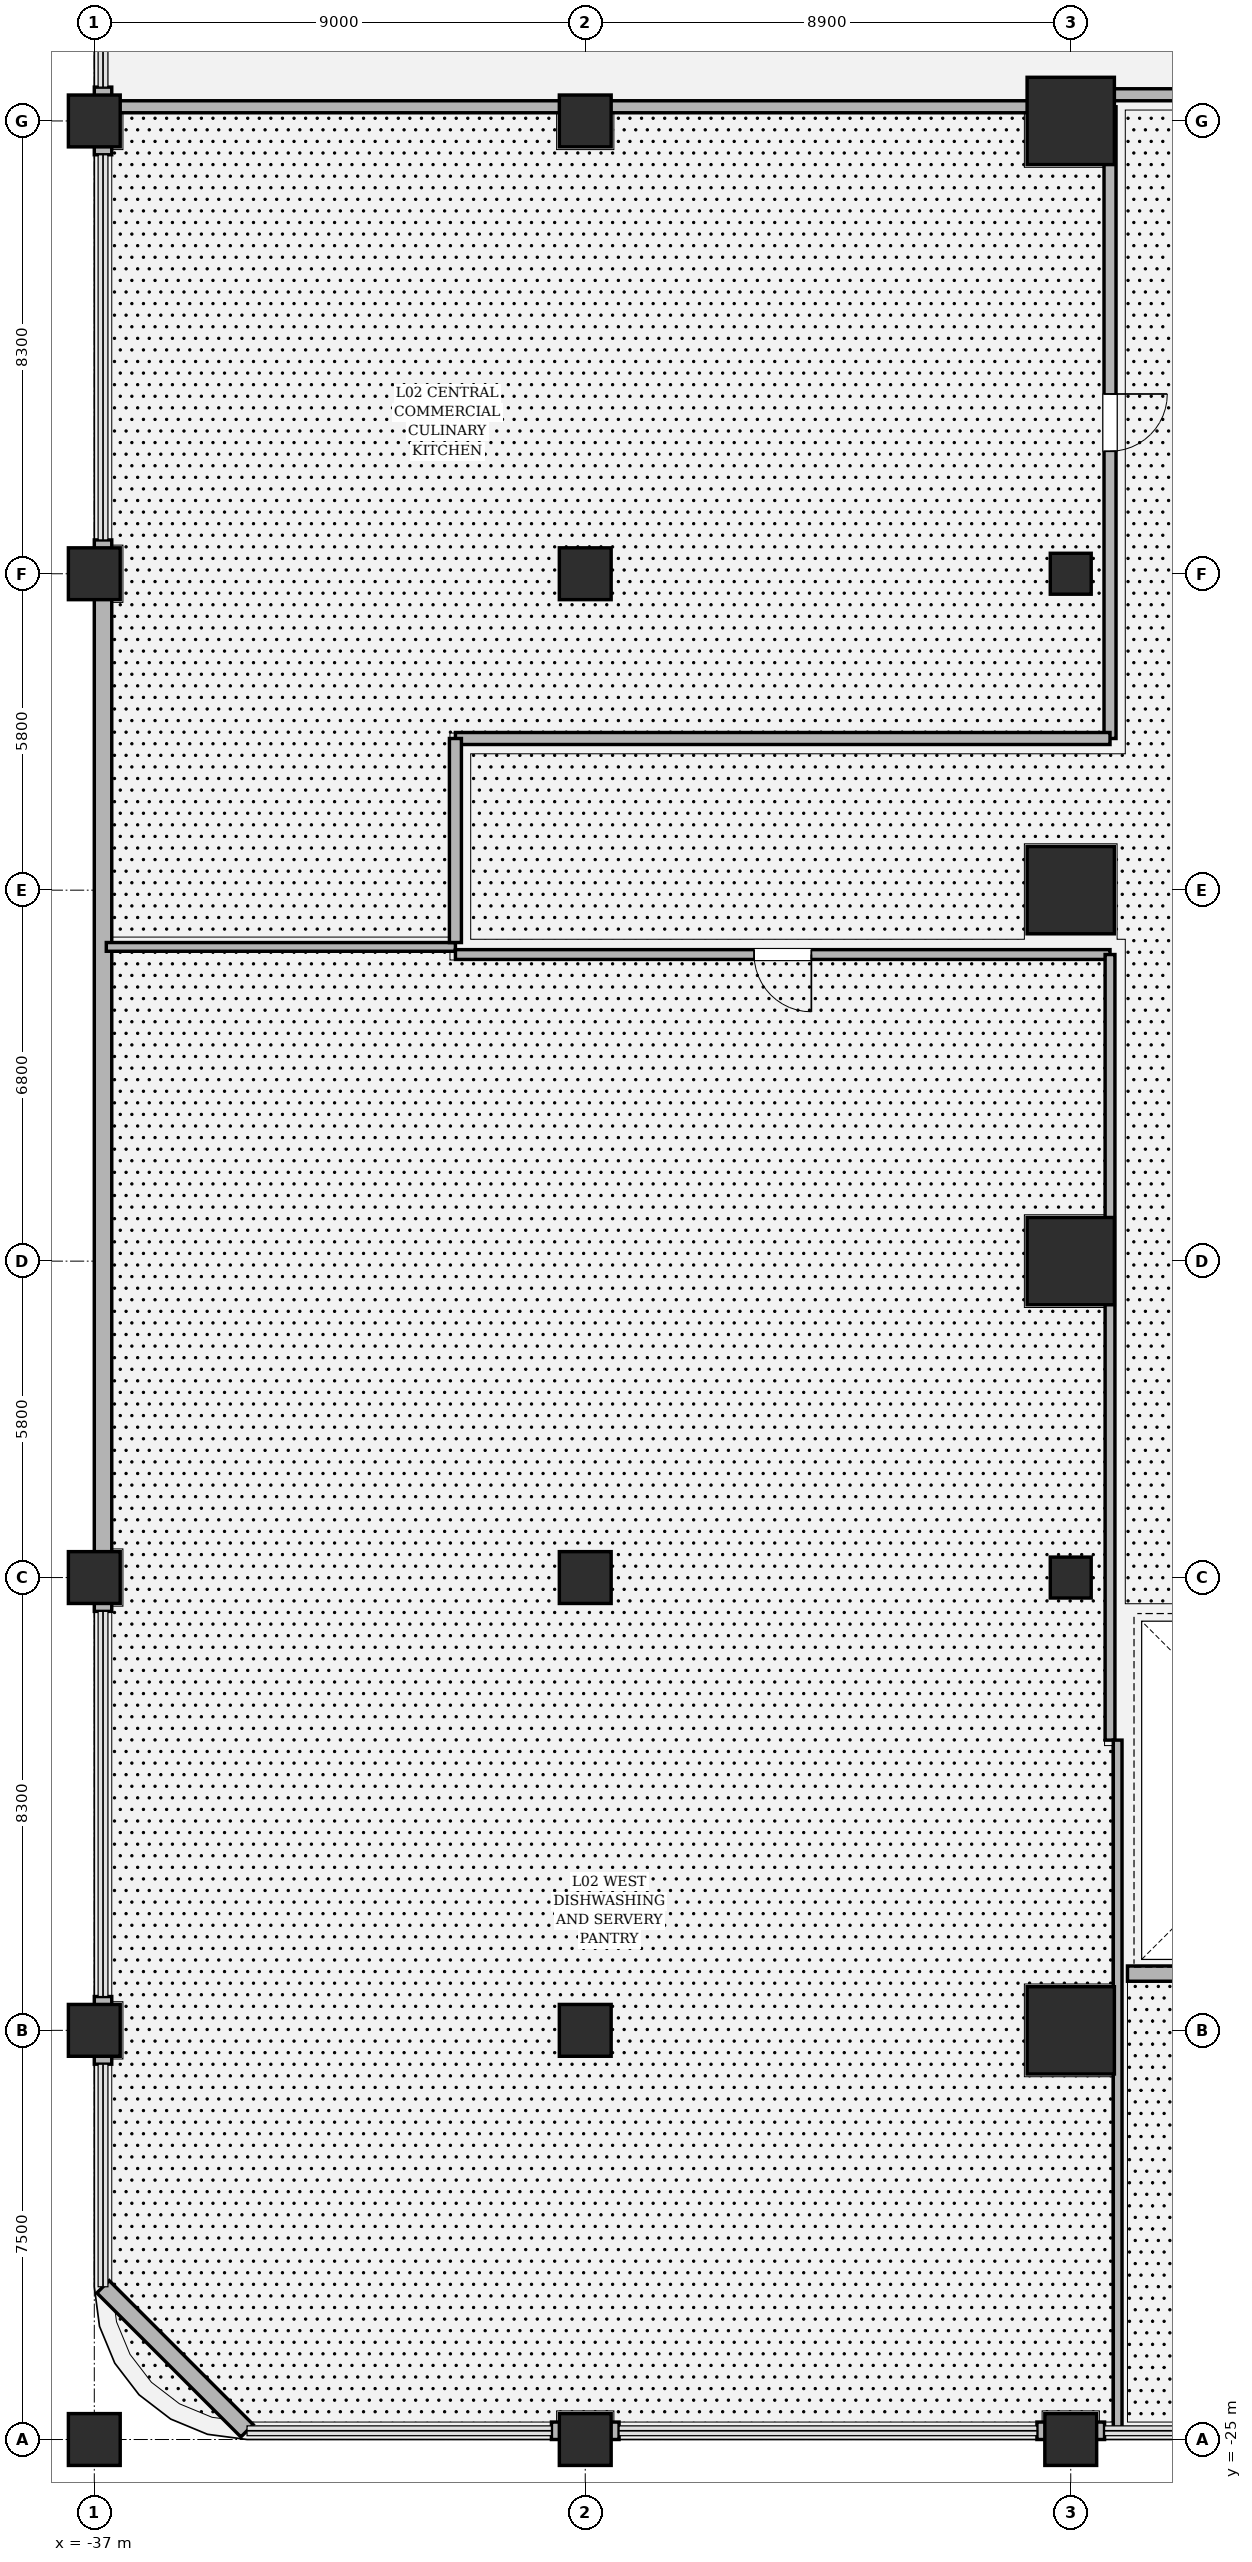
"""IFC4 building model, lengths in metres.
Left out: names, types, materials, properties, quantities, classifications, styles, units other than length and angle.
Written with IfcOpenShell. Run it as: python <this file> out.ifc"""

import sys

from ifc_helpers import new_model, si_unit, direction, frame, frame_2d, origin, origin_2d, place, context, subcontext, project, spatial, rectangle, hollow_rectangle, circle, extrude, element, fill, save


model = new_model("IFC4")
c1 = context("Model", 3, precision=1e-05, world=origin(), true_north=direction((0.0, 1.0)))
c2 = subcontext(c1, "Body", "Model", "MODEL_VIEW")
j1 = project(units=[si_unit("LENGTHUNIT", "METRE"), si_unit("PLANEANGLEUNIT", "RADIAN")], contexts=[c1])
p1 = place(None, origin())
s1 = spatial("IfcSite", under=j1, at=p1, CompositionType="ELEMENT")
p2 = place(p1, origin())
s2 = spatial("IfcBuilding", under=s1, at=p2, CompositionType="ELEMENT")
p3 = place(p2, frame((0.0, 0.0, 11.4)))
s3 = spatial("IfcBuildingStorey", under=s2, at=p3, CompositionType="ELEMENT", Elevation=11.4)
for number, where, z_axis, x_axis in (
    (1, (-19.1, -17.5, 0.0), (0.0, 0.0, 1.0), (1.0, 0.0, 0.0)),
    (2, (-19.1, 17.5, 0.0), (0.0, 0.0, 1.0), (1.0, 0.0, 0.0)),
    (3, (-19.1, 3.4, 0.0), (0.0, 0.0, 1.0), (1.0, 0.0, 0.0)),
    (4, (-19.1, -3.4, 0.0), (0.0, 0.0, 1.0), (1.0, 0.0, 0.0)),
):
    element("IfcColumn", number, at=place(p3, frame(where, z_axis=z_axis, x_axis=x_axis)), inside=s3, PredefinedType="COLUMN", context=c2, shape_type="SweptSolid", body=[
        extrude(hollow_rectangle(XDim=1.6, YDim=1.6, WallThickness=0.05, at=origin_2d()), origin(), (0.0, 0.0, 1.0), 5.4),
    ])
for number, where, z_axis, x_axis in (
    (5, (-37.0, -25.0, 0.0), (0.0, 0.0, 1.0), (1.0, 0.0, 0.0)),
    (6, (-28.0, -25.0, 0.0), (0.0, 0.0, 1.0), (1.0, 0.0, 0.0)),
    (7, (-19.1, -25.0, 0.0), (0.0, 0.0, 1.0), (1.0, 0.0, 0.0)),
    (8, (-37.0, -17.5, 0.0), (0.0, 0.0, 1.0), (1.0, 0.0, 0.0)),
    (9, (-28.0, -17.5, 0.0), (0.0, 0.0, 1.0), (1.0, 0.0, 0.0)),
    (10, (-37.0, -9.2, 0.0), (0.0, 0.0, 1.0), (1.0, 0.0, 0.0)),
    (11, (-37.0, 9.2, 0.0), (0.0, 0.0, 1.0), (1.0, 0.0, 0.0)),
    (12, (-37.0, 17.5, 0.0), (0.0, 0.0, 1.0), (1.0, 0.0, 0.0)),
    (13, (-28.0, 17.5, 0.0), (0.0, 0.0, 1.0), (1.0, 0.0, 0.0)),
    (14, (-28.0, -9.2, 0.0), (0.0, 0.0, 1.0), (1.0, 0.0, 0.0)),
    (15, (-28.0, 9.2, 0.0), (0.0, 0.0, 1.0), (1.0, 0.0, 0.0)),
):
    element("IfcColumn", number, at=place(p3, frame(where, z_axis=z_axis, x_axis=x_axis)), inside=s3, PredefinedType="COLUMN", context=c2, shape_type="SweptSolid", body=[
        extrude(rectangle(XDim=0.95, YDim=0.95, at=origin_2d()), origin(), (0.0, 0.0, 1.0), 5.4),
    ])
for number, where, z_axis, x_axis in (
    (16, (-19.1, -9.2, 0.0), (0.0, 0.0, 1.0), (1.0, 0.0, 0.0)),
    (17, (-19.1, 9.2, 0.0), (0.0, 0.0, 1.0), (1.0, 0.0, 0.0)),
):
    element("IfcColumn", number, at=place(p3, frame(where, z_axis=z_axis, x_axis=x_axis)), inside=s3, PredefinedType="PILASTER", context=c2, shape_type="SweptSolid", body=[
        extrude(circle(Radius=0.375, at=origin_2d()), origin(), (0.0, 0.0, 1.0), 5.4),
    ])
p4 = place(p3, frame((-28.62, -24.84, 0.0), z_axis=(0.0, 0.0, 1.0), x_axis=(1.0, 0.0, 0.0)))
e18 = element("IfcWall", 18, at=p4, inside=s3, PredefinedType="SOLIDWALL", context=c2, shape_type="SweptSolid", body=[
    extrude(rectangle(XDim=1.24, YDim=0.32, at=frame_2d((0.62, 0.0))), origin(), (0.0, 0.0, 1.0), 4.414),
])
p5 = place(p3, frame((-19.72, -24.84, 0.0), z_axis=(0.0, 0.0, 1.0), x_axis=(1.0, 0.0, 0.0)))
e19 = element("IfcWall", 19, at=p5, inside=s3, PredefinedType="SOLIDWALL", context=c2, shape_type="SweptSolid", body=[
    extrude(rectangle(XDim=1.24, YDim=0.32, at=frame_2d((0.62, 0.0))), origin(), (0.0, 0.0, 1.0), 4.414),
])
p6 = place(p3, frame((-36.84, -9.82, 0.0), z_axis=(0.0, 0.0, 1.0), x_axis=(0.0, 1.0, 0.0)))
e20 = element("IfcWall", 20, at=p6, inside=s3, PredefinedType="SOLIDWALL", context=c2, shape_type="SweptSolid", body=[
    extrude(rectangle(XDim=19.64, YDim=0.32, at=frame_2d((9.82, 0.0))), origin(), (0.0, 0.0, 1.0), 3.264),
])
for number, where, z_axis, x_axis in (
    (21, (-36.84, -18.12, 0.0), (0.0, 0.0, 1.0), (0.0, 1.0, 0.0)),
    (22, (-36.84, 16.88, 0.0), (0.0, 0.0, 1.0), (0.0, 1.0, 0.0)),
):
    element("IfcWall", number, at=place(p3, frame(where, z_axis=z_axis, x_axis=x_axis)), inside=s3, PredefinedType="SOLIDWALL", context=c2, shape_type="SweptSolid", body=[
        extrude(rectangle(XDim=1.24, YDim=0.32, at=frame_2d((0.62, 0.0))), origin(), (0.0, 0.0, 1.0), 4.414),
    ])
p7 = place(p3, frame((-34.2, -24.84, 0.0), z_axis=(0.0, 0.0, 1.0), x_axis=(-0.707106781187, 0.707106781187, 0.0)))
e23 = element("IfcWall", 23, at=p7, inside=s3, PredefinedType="SOLIDWALL", context=c2, shape_type="SweptSolid", body=[
    extrude(rectangle(XDim=3.734, YDim=0.32, at=frame_2d((1.867, 0.0))), origin(), (0.0, 0.0, 1.0), 4.564),
])
p8 = place(p3, frame((-36.78, 2.36, 0.0), z_axis=(0.0, 0.0, 1.0), x_axis=(1.0, 0.0, 0.0)))
e24 = element("IfcWall", 24, at=p8, inside=s3, PredefinedType="PARTITIONING", context=c2, shape_type="SweptSolid", body=[
    extrude(rectangle(XDim=6.4, YDim=0.16, at=frame_2d((3.2, 0.0))), origin(), (0.0, 0.0, 1.0), 5.12),
])
p9 = place(p3, frame((-30.38, 2.22, 0.0), z_axis=(0.0, 0.0, 1.0), x_axis=(1.0, 0.0, 0.0)))
e25 = element("IfcWall", 25, at=p9, inside=s3, PredefinedType="PARTITIONING", context=c2, shape_type="SweptSolid", body=[
    extrude(rectangle(XDim=12.0, YDim=0.18, at=frame_2d((6.0, 0.0))), origin(), (0.0, 0.0, 1.0), 4.414),
])
p10 = place(p9, frame((5.475, 0.0, 0.0)))
e26 = element("IfcOpeningElement", 26, at=p10, cuts=e25, PredefinedType="OPENING", context=c2, shape_type="SweptSolid", body=[
    extrude(rectangle(XDim=1.05, YDim=2.2, at=frame_2d((0.525, 1.1))), frame((0.0, 0.1, 0.0), z_axis=(0.0, -1.0, 0.0), x_axis=(1.0, 0.0, 0.0)), (0.0, 0.0, 1.0), 0.2),
])
p11 = place(p3, frame((-18.38, 2.22, 0.0), z_axis=(0.0, 0.0, 1.0), x_axis=(0.0, -1.0, 0.0)))
e27 = element("IfcWall", 27, at=p11, inside=s3, PredefinedType="PARTITIONING", context=c2, shape_type="SweptSolid", body=[
    extrude(rectangle(XDim=14.4, YDim=0.18, at=frame_2d((7.2, 0.0))), origin(), (0.0, 0.0, 1.0), 4.414),
])
p12 = place(p3, frame((-18.24, -12.18, 0.0), z_axis=(0.0, 0.0, 1.0), x_axis=(0.0, -1.0, 0.0)))
e28 = element("IfcWall", 28, at=p12, inside=s3, PredefinedType="PARTITIONING", context=c2, shape_type="SweptSolid", body=[
    extrude(rectangle(XDim=12.6, YDim=0.16, at=frame_2d((6.3, 0.0))), origin(), (0.0, 0.0, 1.0), 4.414),
])
p13 = place(p3, frame((-18.06, -16.46, 0.0), z_axis=(0.0, 0.0, 1.0), x_axis=(1.0, 0.0, 0.0)))
e29 = element("IfcWall", 29, at=p13, inside=s3, PredefinedType="SOLIDWALL", context=c2, shape_type="SweptSolid", body=[
    extrude(rectangle(XDim=6.72, YDim=0.28, at=frame_2d((3.36, 0.0))), origin(), (0.0, 0.0, 1.0), 4.664),
])
p14 = place(p3, frame((-36.78, 17.76, 0.0), z_axis=(0.0, 0.0, 1.0), x_axis=(1.0, 0.0, 0.0)))
e30 = element("IfcWall", 30, at=p14, inside=s3, PredefinedType="SOLIDWALL", context=c2, shape_type="SweptSolid", body=[
    extrude(rectangle(XDim=18.4, YDim=0.22, at=frame_2d((9.2, 0.0))), origin(), (0.0, 0.0, 1.0), 4.414),
])
p15 = place(p3, frame((-18.38, 17.76, 0.0), z_axis=(0.0, 0.0, 1.0), x_axis=(0.0, -1.0, 0.0)))
e31 = element("IfcWall", 31, at=p15, inside=s3, PredefinedType="SOLIDWALL", context=c2, shape_type="SweptSolid", body=[
    extrude(rectangle(XDim=11.58, YDim=0.22, at=frame_2d((5.79, 0.0))), origin(), (0.0, 0.0, 1.0), 4.414),
])
p16 = place(p15, frame((5.265, 0.0, 0.0)))
e32 = element("IfcOpeningElement", 32, at=p16, cuts=e31, PredefinedType="OPENING", context=c2, shape_type="SweptSolid", body=[
    extrude(rectangle(XDim=1.05, YDim=2.2, at=frame_2d((0.525, 1.1))), frame((0.0, 0.12, 0.0), z_axis=(0.0, -1.0, 0.0), x_axis=(1.0, 0.0, 0.0)), (0.0, 0.0, 1.0), 0.24),
])
p17 = place(p3, frame((-18.38, 6.18, 0.0), z_axis=(0.0, 0.0, 1.0), x_axis=(-1.0, 0.0, 0.0)))
e33 = element("IfcWall", 33, at=p17, inside=s3, PredefinedType="SOLIDWALL", context=c2, shape_type="SweptSolid", body=[
    extrude(rectangle(XDim=12.0, YDim=0.22, at=frame_2d((6.0, 0.0))), origin(), (0.0, 0.0, 1.0), 4.414),
])
p18 = place(p3, frame((-30.38, 6.18, 0.0), z_axis=(0.0, 0.0, 1.0), x_axis=(0.0, -1.0, 0.0)))
e34 = element("IfcWall", 34, at=p18, inside=s3, PredefinedType="SOLIDWALL", context=c2, shape_type="SweptSolid", body=[
    extrude(rectangle(XDim=3.74, YDim=0.22, at=frame_2d((1.87, 0.0))), origin(), (0.0, 0.0, 1.0), 3.264),
])
p19 = place(p3, frame((-16.46, 17.98, 0.0), z_axis=(0.0, 0.0, 1.0), x_axis=(-1.0, 0.0, 0.0)))
e35 = element("IfcWall", 35, at=p19, inside=s3, PredefinedType="SOLIDWALL", context=c2, shape_type="SweptSolid", body=[
    extrude(rectangle(XDim=1.92, YDim=0.22, at=frame_2d((0.96, 0.0))), origin(), (0.0, 0.0, 1.0), 5.12),
])
p20 = place(p10, origin())
e36 = element("IfcDoor", 36, at=p20, inside=s3, OperationType="SINGLE_SWING_RIGHT", PredefinedType="DOOR", context=c2, shape_type="SweptSolid", body=[
    extrude(rectangle(XDim=1.05, YDim=2.2, at=frame_2d((0.525, 1.1))), frame((0.0, 0.025, 0.0), z_axis=(0.0, -1.0, 0.0), x_axis=(1.0, 0.0, 0.0)), (0.0, 0.0, 1.0), 0.05),
])
fill(e26, e36)
p21 = place(p16, origin())
e37 = element("IfcDoor", 37, at=p21, inside=s3, OperationType="SINGLE_SWING_LEFT", PredefinedType="DOOR", context=c2, shape_type="SweptSolid", body=[
    extrude(rectangle(XDim=1.05, YDim=2.2, at=frame_2d((0.525, 1.1))), frame((0.0, 0.025, 0.0), z_axis=(0.0, -1.0, 0.0), x_axis=(1.0, 0.0, 0.0)), (0.0, 0.0, 1.0), 0.05),
])
fill(e32, e37)
save(model, sys.argv[1])
